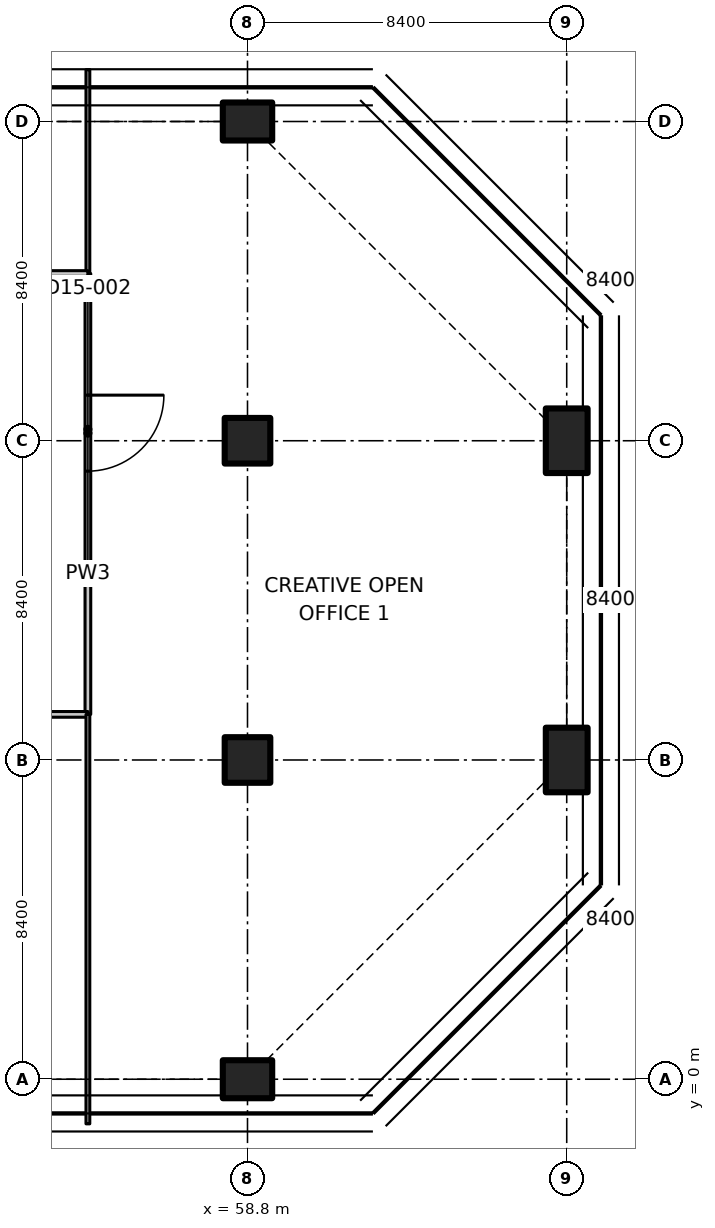
"""IFC4 building model, lengths in metres.
Left out: names, types, materials, properties, quantities, classifications, styles, units other than length and angle.
Written with IfcOpenShell. Run it as: python <this file> out.ifc"""

import sys

from ifc_helpers import new_model, si_unit, direction, frame, frame_2d, origin, origin_2d, place, context, subcontext, project, spatial, polyline, rectangle, outline, extrude, element, fill, save


model = new_model("IFC4")
c1 = context("Model", 3, precision=1e-05, world=origin(), true_north=direction((0.0, 1.0)))
c2 = subcontext(c1, "Body", "Model", "MODEL_VIEW")
j1 = project(units=[si_unit("LENGTHUNIT", "METRE"), si_unit("PLANEANGLEUNIT", "RADIAN")], contexts=[c1])
p1 = place(None, origin())
s1 = spatial("IfcSite", under=j1, at=p1, CompositionType="ELEMENT")
p2 = place(p1, origin())
s2 = spatial("IfcBuilding", under=s1, at=p2, CompositionType="ELEMENT")
p3 = place(p2, frame((0.0, 0.0, 113.3)))
s3 = spatial("IfcBuildingStorey", under=s2, at=p3, CompositionType="ELEMENT", Elevation=113.3)
p4 = place(p3, frame((58.8, 0.0, 0.0), z_axis=(0.0, 0.0, 1.0), x_axis=(0.0, 1.0, 0.0)))
e1 = element("IfcColumn", 1, at=p4, inside=s3, PredefinedType="COLUMN", context=c2, shape_type="SweptSolid", body=[
    extrude(rectangle(XDim=1.0, YDim=1.3, at=origin_2d()), origin(), (0.0, 0.0, 1.0), 3.35),
])
for number, where, z_axis, x_axis in (
    (2, (58.8, 8.4, 0.0), (0.0, 0.0, 1.0), (1.0, 0.0, 0.0)),
    (3, (58.8, 16.8, 0.0), (0.0, 0.0, 1.0), (1.0, 0.0, 0.0)),
):
    element("IfcColumn", number, at=place(p3, frame(where, z_axis=z_axis, x_axis=x_axis)), inside=s3, PredefinedType="COLUMN", context=c2, shape_type="SweptSolid", body=[
        extrude(rectangle(XDim=1.2, YDim=1.2, at=origin_2d()), origin(), (0.0, 0.0, 1.0), 3.35),
    ])
p5 = place(p3, frame((58.8, 25.2, 0.0), z_axis=(0.0, 0.0, 1.0), x_axis=(0.0, 1.0, 0.0)))
e4 = element("IfcColumn", 4, at=p5, inside=s3, PredefinedType="COLUMN", context=c2, shape_type="SweptSolid", body=[
    extrude(rectangle(XDim=1.0, YDim=1.3, at=origin_2d()), origin(), (0.0, 0.0, 1.0), 3.35),
])
for number, where, z_axis, x_axis in (
    (5, (67.2, 8.4, 0.0), (0.0, 0.0, 1.0), (1.0, 0.0, 0.0)),
    (6, (67.2, 16.8, 0.0), (0.0, 0.0, 1.0), (1.0, 0.0, 0.0)),
):
    element("IfcColumn", number, at=place(p3, frame(where, z_axis=z_axis, x_axis=x_axis)), inside=s3, PredefinedType="COLUMN", context=c2, shape_type="SweptSolid", body=[
        extrude(rectangle(XDim=1.1, YDim=1.7, at=origin_2d()), origin(), (0.0, 0.0, 1.0), 3.35),
    ])
p6 = place(p3, frame((54.6, 13.0, 0.0), z_axis=(0.0, 0.0, 1.0), x_axis=(0.0, -1.0, 0.0)))
e7 = element("IfcWall", 7, at=p6, inside=s3, PredefinedType="PARTITIONING", context=c2, shape_type="SweptSolid", body=[
    extrude(rectangle(XDim=3.4, YDim=0.15, at=frame_2d((1.7, 0.0))), origin(), (0.0, 0.0, 1.0), 3.33),
])
p7 = place(p3, frame((54.6, 9.6, 0.0), z_axis=(0.0, 0.0, 1.0), x_axis=(-1.0, 0.0, 0.0)))
e8 = element("IfcWall", 8, at=p7, inside=s3, PredefinedType="PARTITIONING", context=c2, shape_type="SweptSolid", body=[
    extrude(rectangle(XDim=4.2, YDim=0.15, at=frame_2d((2.1, 0.0))), origin(), (0.0, 0.0, 1.0), 3.33),
])
p8 = place(p7, frame((1.5, 0.0, 0.0)))
e9 = element("IfcOpeningElement", 9, at=p8, cuts=e8, PredefinedType="OPENING", context=c2, shape_type="SweptSolid", body=[
    extrude(rectangle(XDim=1.1, YDim=2.1, at=frame_2d((0.55, 1.05))), frame((0.0, 0.085, 0.0), z_axis=(0.0, -1.0, 0.0), x_axis=(1.0, 0.0, 0.0)), (0.0, 0.0, 1.0), 0.17),
])
p9 = place(p3, frame((54.6, 21.2, 0.0), z_axis=(0.0, 0.0, 1.0), x_axis=(0.0, -1.0, 0.0)))
e10 = element("IfcWall", 10, at=p9, inside=s3, PredefinedType="PARTITIONING", context=c2, shape_type="SweptSolid", body=[
    extrude(rectangle(XDim=8.2, YDim=0.15, at=frame_2d((4.1, 0.0))), origin(), (0.0, 0.0, 1.0), 3.33),
])
p10 = place(p9, frame((3.2, 0.0, 0.0)))
e11 = element("IfcOpeningElement", 11, at=p10, cuts=e10, PredefinedType="OPENING", context=c2, shape_type="SweptSolid", body=[
    extrude(rectangle(XDim=2.0, YDim=2.4, at=frame_2d((1.0, 1.2))), frame((0.0, 0.085, 0.0), z_axis=(0.0, -1.0, 0.0), x_axis=(1.0, 0.0, 0.0)), (0.0, 0.0, 1.0), 0.17),
])
p11 = place(p3, frame((54.6, -1.174, 0.0), z_axis=(0.0, 0.0, 1.0), x_axis=(0.0, 1.0, 0.0)))
e12 = element("IfcWall", 12, at=p11, inside=s3, PredefinedType="PARTITIONING", context=c2, shape_type="SweptSolid", body=[
    extrude(outline(polyline([(0.0, 0.0), (10.774, 0.0), (10.774, 3.33), (1.624, 3.33), (1.622, 2.98), (0.726, 2.98), (0.724, 3.33), (0.074, 3.33), (0.0, 3.33), (0.0, 0.0)])), frame((0.0, 0.05, 0.0), z_axis=(0.0, -1.0, 0.0), x_axis=(1.0, 0.0, 0.0)), (0.0, 0.0, 1.0), 0.1),
])
p12 = place(p3, frame((54.6, 21.2, 0.0), z_axis=(0.0, 0.0, 1.0), x_axis=(0.0, 1.0, 0.0)))
e13 = element("IfcWall", 13, at=p12, inside=s3, PredefinedType="PARTITIONING", context=c2, shape_type="SweptSolid", body=[
    extrude(outline(polyline([(0.0, 0.0), (5.365, 0.0), (5.365, 3.33), (5.1, 3.33), (4.45, 3.33), (4.448, 2.98), (3.552, 2.98), (3.55, 3.33), (0.0, 3.33), (0.0, 0.0)])), frame((0.0, 0.05, 0.0), z_axis=(0.0, -1.0, 0.0), x_axis=(1.0, 0.0, 0.0)), (0.0, 0.0, 1.0), 0.1),
])
p13 = place(p3, frame((51.0, 21.2, 0.0), z_axis=(0.0, 0.0, 1.0), x_axis=(1.0, 0.0, 0.0)))
e14 = element("IfcWall", 14, at=p13, inside=s3, PredefinedType="PARTITIONING", context=c2, shape_type="SweptSolid", body=[
    extrude(rectangle(XDim=3.6, YDim=0.15, at=frame_2d((1.8, 0.0))), origin(), (0.0, 0.0, 1.0), 3.33),
])
p14 = place(p10, origin())
e15 = element("IfcDoor", 15, at=p14, inside=s3, OperationType="DOUBLE_DOOR_SINGLE_SWING", PredefinedType="DOOR", context=c2, shape_type="SweptSolid", body=[
    extrude(rectangle(XDim=2.0, YDim=2.4, at=frame_2d((1.0, 1.2))), frame((0.0, 0.025, 0.0), z_axis=(0.0, -1.0, 0.0), x_axis=(1.0, 0.0, 0.0)), (0.0, 0.0, 1.0), 0.05),
])
fill(e11, e15)
save(model, sys.argv[1])
